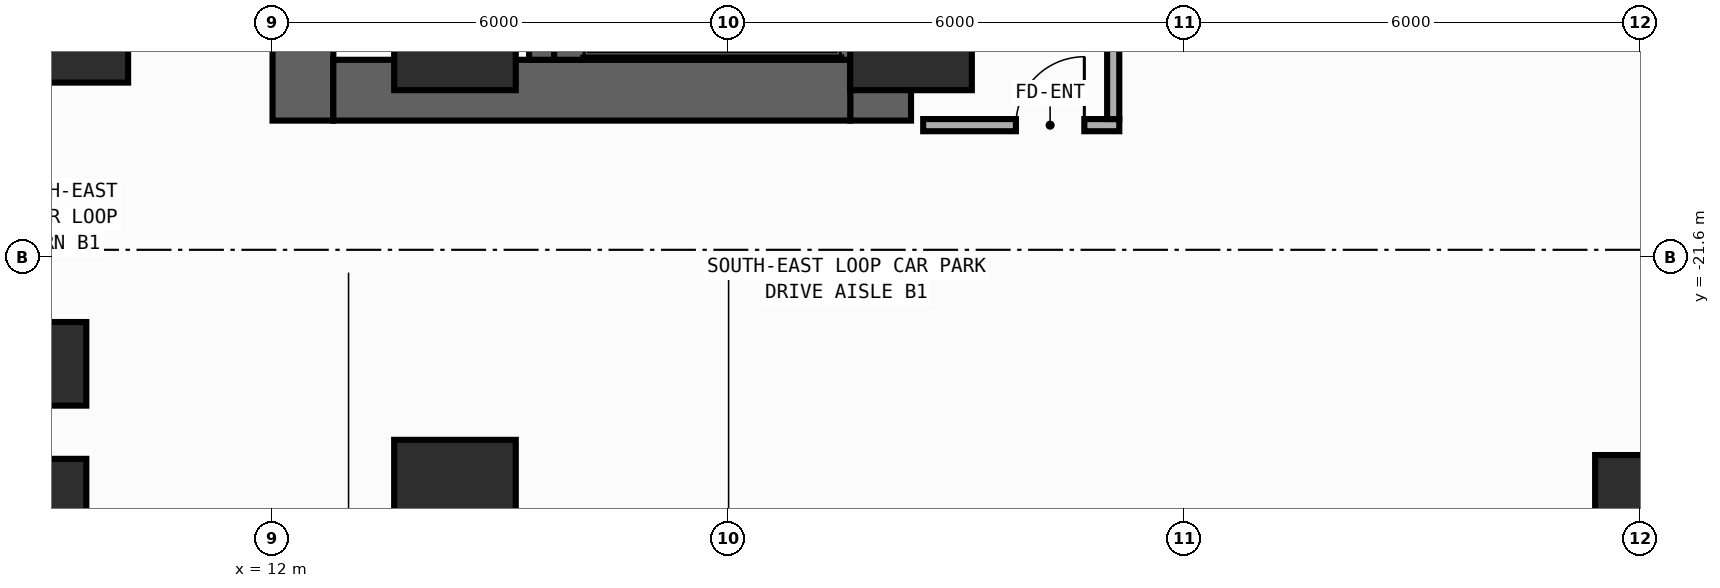
"""IFC4 building model, lengths in metres.
Left out: names, types, materials, properties, quantities, classifications, styles, units other than length and angle.
Written with IfcOpenShell. Run it as: python <this file> out.ifc"""

import sys

from ifc_helpers import new_model, si_unit, direction, frame, frame_2d, origin, origin_2d, place, context, subcontext, project, spatial, rectangle, extrude, element, fill, save


model = new_model("IFC4")
c1 = context("Model", 3, precision=1e-05, world=origin(), true_north=direction((0.0, 1.0)))
c2 = subcontext(c1, "Body", "Model", "MODEL_VIEW")
j1 = project(units=[si_unit("LENGTHUNIT", "METRE"), si_unit("PLANEANGLEUNIT", "RADIAN")], contexts=[c1])
p1 = place(None, origin())
s1 = spatial("IfcSite", under=j1, at=p1, CompositionType="ELEMENT")
p2 = place(p1, origin())
s2 = spatial("IfcBuilding", under=s1, at=p2, CompositionType="ELEMENT")
p3 = place(p2, frame((0.0, 0.0, -4.5)))
s3 = spatial("IfcBuildingStorey", under=s2, at=p3, CompositionType="ELEMENT", Elevation=-4.5)
p4 = place(p3, frame((12.4, -19.8, 0.0), z_axis=(0.0, 0.0, 1.0), x_axis=(0.0, 1.0, 0.0)))
e1 = element("IfcWall", 1, at=p4, inside=s3, PredefinedType="SHEAR", context=c2, shape_type="SweptSolid", body=[
    extrude(rectangle(XDim=27.0, YDim=0.8, at=frame_2d((13.5, 0.0))), origin(), (0.0, 0.0, 1.0), 4.2),
])
p5 = place(p4, frame((19.875, 0.0, 0.0)))
e2 = element("IfcOpeningElement", 2, at=p5, cuts=e1, PredefinedType="OPENING", context=c2, shape_type="SweptSolid", body=[
    extrude(rectangle(XDim=0.85, YDim=2.1, at=frame_2d((0.425, 1.05))), frame((0.0, 0.41, 0.0), z_axis=(0.0, -1.0, 0.0), x_axis=(1.0, 0.0, 0.0)), (0.0, 0.0, 1.0), 0.82),
])
p6 = place(p4, frame((10.175, 0.0, 0.0)))
e3 = element("IfcOpeningElement", 3, at=p6, cuts=e1, PredefinedType="OPENING", context=c2, shape_type="SweptSolid", body=[
    extrude(rectangle(XDim=0.85, YDim=2.1, at=frame_2d((0.425, 1.05))), frame((0.0, 0.41, 0.0), z_axis=(0.0, -1.0, 0.0), x_axis=(1.0, 0.0, 0.0)), (0.0, 0.0, 1.0), 0.82),
])
p7 = place(p4, frame((12.725, 0.0, 0.0)))
e4 = element("IfcOpeningElement", 4, at=p7, cuts=e1, PredefinedType="OPENING", context=c2, shape_type="SweptSolid", body=[
    extrude(rectangle(XDim=1.15, YDim=2.2, at=frame_2d((0.575, 1.1))), frame((0.0, 0.41, 0.0), z_axis=(0.0, -1.0, 0.0), x_axis=(1.0, 0.0, 0.0)), (0.0, 0.0, 1.0), 0.82),
])
p8 = place(p4, frame((25.125, 0.0, 0.0)))
e5 = element("IfcOpeningElement", 5, at=p8, cuts=e1, PredefinedType="OPENING", context=c2, shape_type="SweptSolid", body=[
    extrude(rectangle(XDim=0.85, YDim=2.1, at=frame_2d((0.425, 1.05))), frame((0.0, 0.41, 0.0), z_axis=(0.0, -1.0, 0.0), x_axis=(1.0, 0.0, 0.0)), (0.0, 0.0, 1.0), 0.82),
])
p9 = place(p3, frame((20.0, -19.8, 0.0), z_axis=(0.0, 0.0, 1.0), x_axis=(0.0, 1.0, 0.0)))
e6 = element("IfcWall", 6, at=p9, inside=s3, PredefinedType="SHEAR", context=c2, shape_type="SweptSolid", body=[
    extrude(rectangle(XDim=27.0, YDim=0.8, at=frame_2d((13.5, 0.0))), origin(), (0.0, 0.0, 1.0), 4.2),
])
p10 = place(p3, frame((12.8, -19.4, 0.0), z_axis=(0.0, 0.0, 1.0), x_axis=(1.0, 0.0, 0.0)))
e7 = element("IfcWall", 7, at=p10, inside=s3, PredefinedType="SHEAR", context=c2, shape_type="SweptSolid", body=[
    extrude(rectangle(XDim=6.8, YDim=0.8, at=frame_2d((3.4, 0.0))), origin(), (0.0, 0.0, 1.0), 4.2),
])
p11 = place(p3, frame((15.55, -19.0, 0.0), z_axis=(0.0, 0.0, 1.0), x_axis=(0.0, 1.0, 0.0)))
e8 = element("IfcWall", 8, at=p11, inside=s3, PredefinedType="SHEAR", context=c2, shape_type="SweptSolid", body=[
    extrude(rectangle(XDim=25.4, YDim=0.35, at=frame_2d((12.7, 0.0))), origin(), (0.0, 0.0, 1.0), 4.2),
])
p12 = place(p11, frame((11.925, 0.0, 0.0)))
e9 = element("IfcOpeningElement", 9, at=p12, cuts=e8, PredefinedType="OPENING", context=c2, shape_type="SweptSolid", body=[
    extrude(rectangle(XDim=1.15, YDim=2.2, at=frame_2d((0.575, 1.1))), frame((0.0, 0.185, 0.0), z_axis=(0.0, -1.0, 0.0), x_axis=(1.0, 0.0, 0.0)), (0.0, 0.0, 1.0), 0.37),
])
p13 = place(p11, frame((24.325, 0.0, 0.0)))
e10 = element("IfcOpeningElement", 10, at=p13, cuts=e8, PredefinedType="OPENING", context=c2, shape_type="SweptSolid", body=[
    extrude(rectangle(XDim=0.85, YDim=2.1, at=frame_2d((0.425, 1.05))), frame((0.0, 0.185, 0.0), z_axis=(0.0, -1.0, 0.0), x_axis=(1.0, 0.0, 0.0)), (0.0, 0.0, 1.0), 0.37),
])
p14 = place(p3, frame((15.705, -18.89, 0.0), z_axis=(0.0, 0.0, 1.0), x_axis=(1.0, 0.0, 0.0)))
e11 = element("IfcWall", 11, at=p14, inside=s3, PredefinedType="SHEAR", context=c2, shape_type="SweptSolid", body=[
    extrude(rectangle(XDim=3.915, YDim=0.22, at=frame_2d((1.958, 0.0))), origin(), (0.0, 0.0, 1.0), 4.2),
])
p15 = place(p3, frame((9.2, -18.6, 0.0), z_axis=(0.0, 0.0, 1.0), x_axis=(1.0, 0.0, 0.0)))
e12 = element("IfcColumn", 12, at=p15, inside=s3, PredefinedType="COLUMN", context=c2, shape_type="SweptSolid", body=[
    extrude(rectangle(XDim=1.8, YDim=1.4, at=origin_2d()), origin(), (0.0, 0.0, 1.0), 4.5),
])
for number, where, z_axis, x_axis in (
    (13, (20.4, -18.6, 0.0), (0.0, 0.0, 1.0), (1.0, 0.0, 0.0)),
    (14, (14.4, -18.6, 0.0), (0.0, 0.0, 1.0), (1.0, 0.0, 0.0)),
):
    element("IfcColumn", number, at=place(p3, frame(where, z_axis=z_axis, x_axis=x_axis)), inside=s3, PredefinedType="COLUMN", context=c2, shape_type="SweptSolid", body=[
        extrude(rectangle(XDim=1.6, YDim=1.6, at=origin_2d()), origin(), (0.0, 0.0, 1.0), 4.5),
    ])
p16 = place(p3, frame((30.0, -24.8, 0.0), z_axis=(0.0, 0.0, 1.0), x_axis=(1.0, 0.0, 0.0)))
e15 = element("IfcColumn", 15, at=p16, inside=s3, PredefinedType="COLUMN", context=c2, shape_type="SweptSolid", body=[
    extrude(rectangle(XDim=1.2, YDim=1.2, at=origin_2d()), origin(), (0.0, 0.0, 1.0), 4.5),
])
p17 = place(p3, frame((9.2, -24.8, 0.0), z_axis=(0.0, 0.0, 1.0), x_axis=(1.0, 0.0, 0.0)))
e16 = element("IfcColumn", 16, at=p17, inside=s3, PredefinedType="PILASTER", context=c2, shape_type="SweptSolid", body=[
    extrude(rectangle(XDim=0.7, YDim=1.1, at=origin_2d()), origin(), (0.0, 0.0, 1.0), 4.5),
])
p18 = place(p3, frame((14.4, -24.8, 0.0), z_axis=(0.0, 0.0, 1.0), x_axis=(1.0, 0.0, 0.0)))
e17 = element("IfcColumn", 17, at=p18, inside=s3, PredefinedType="COLUMN", context=c2, shape_type="SweptSolid", body=[
    extrude(rectangle(XDim=1.6, YDim=1.6, at=origin_2d()), origin(), (0.0, 0.0, 1.0), 4.5),
])
p19 = place(p3, frame((9.2, -23.0, 0.0), z_axis=(0.0, 0.0, 1.0), x_axis=(1.0, 0.0, 0.0)))
e18 = element("IfcColumn", 18, at=p19, inside=s3, PredefinedType="PILASTER", context=c2, shape_type="SweptSolid", body=[
    extrude(rectangle(XDim=0.7, YDim=1.1, at=origin_2d()), origin(), (0.0, 0.0, 1.0), 4.5),
])
p20 = place(p3, frame((20.56, -19.86, 0.0), z_axis=(0.0, 0.0, 1.0), x_axis=(1.0, 0.0, 0.0)))
e19 = element("IfcWall", 19, at=p20, inside=s3, PredefinedType="PARTITIONING", context=c2, shape_type="SweptSolid", body=[
    extrude(rectangle(XDim=2.58, YDim=0.16, at=frame_2d((1.29, 0.0))), origin(), (0.0, 0.0, 1.0), 4.2),
])
p21 = place(p20, frame((1.22, 0.0, 0.0)))
e20 = element("IfcOpeningElement", 20, at=p21, cuts=e19, PredefinedType="OPENING", context=c2, shape_type="SweptSolid", body=[
    extrude(rectangle(XDim=0.9, YDim=2.15, at=frame_2d((0.45, 1.075))), frame((0.0, 0.09, 0.0), z_axis=(0.0, -1.0, 0.0), x_axis=(1.0, 0.0, 0.0)), (0.0, 0.0, 1.0), 0.18),
])
p22 = place(p3, frame((23.06, -19.78, 0.0), z_axis=(0.0, 0.0, 1.0), x_axis=(0.0, 1.0, 0.0)))
e21 = element("IfcWall", 21, at=p22, inside=s3, PredefinedType="PARTITIONING", context=c2, shape_type="SweptSolid", body=[
    extrude(rectangle(XDim=12.74, YDim=0.16, at=frame_2d((6.37, 0.0))), origin(), (0.0, 0.0, 1.0), 4.2),
])
p23 = place(p22, frame((4.302, 0.0, 0.0)))
e22 = element("IfcOpeningElement", 22, at=p23, cuts=e21, PredefinedType="OPENING", context=c2, shape_type="SweptSolid", body=[
    extrude(rectangle(XDim=0.9, YDim=2.15, at=frame_2d((0.45, 1.075))), frame((0.0, 0.09, 0.0), z_axis=(0.0, -1.0, 0.0), x_axis=(1.0, 0.0, 0.0)), (0.0, 0.0, 1.0), 0.18),
])
p24 = place(p21, origin())
e23 = element("IfcDoor", 23, at=p24, inside=s3, OperationType="SINGLE_SWING_RIGHT", PredefinedType="DOOR", context=c2, shape_type="SweptSolid", body=[
    extrude(rectangle(XDim=0.9, YDim=2.15, at=frame_2d((0.45, 1.075))), frame((0.0, 0.025, 0.0), z_axis=(0.0, -1.0, 0.0), x_axis=(1.0, 0.0, 0.0)), (0.0, 0.0, 1.0), 0.05),
])
fill(e20, e23)
save(model, sys.argv[1])
